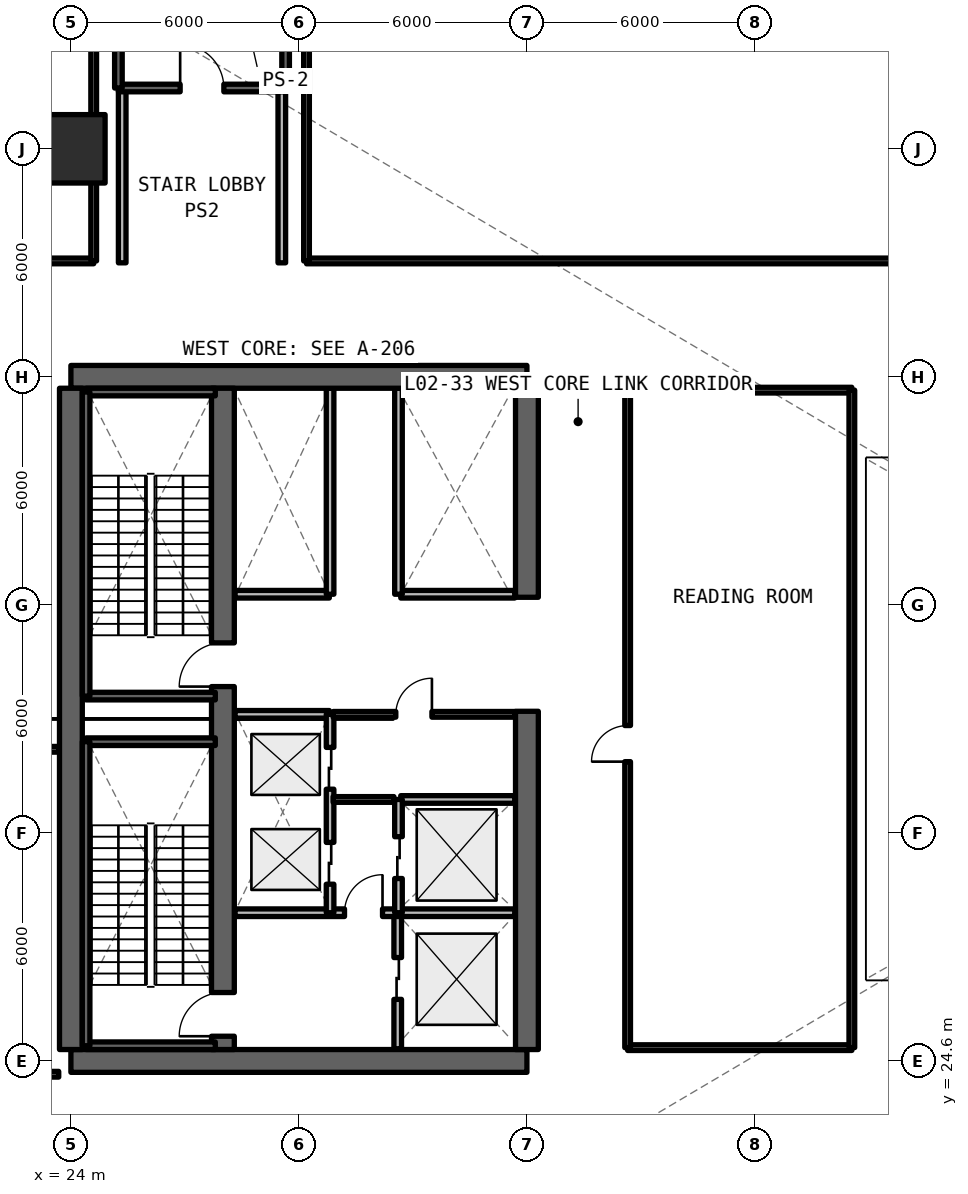
"""IFC4 building model, lengths in metres.
Left out: names, types, materials, properties, quantities, classifications, styles, units other than length and angle.
Written with IfcOpenShell. Run it as: python <this file> out.ifc"""

import sys

from ifc_helpers import new_model, si_unit, direction, frame, frame_2d, origin, origin_2d, place, context, subcontext, project, spatial, rectangle, extrude, element, fill, save


model = new_model("IFC4")
c1 = context("Model", 3, precision=1e-05, world=origin(), true_north=direction((0.0, 1.0)))
c2 = subcontext(c1, "Body", "Model", "MODEL_VIEW")
j1 = project(units=[si_unit("LENGTHUNIT", "METRE"), si_unit("PLANEANGLEUNIT", "RADIAN")], contexts=[c1])
p1 = place(None, origin())
s1 = spatial("IfcSite", under=j1, at=p1, CompositionType="ELEMENT")
p2 = place(p1, origin())
s2 = spatial("IfcBuilding", under=s1, at=p2, CompositionType="ELEMENT")
p3 = place(p2, frame((0.0, 0.0, 4.95)))
s3 = spatial("IfcBuildingStorey", under=s2, at=p3, CompositionType="ELEMENT", Elevation=4.95)
for number, where, z_axis, x_axis in (
    (1, (24.0, 24.6, 0.0), (0.0, 0.0, 1.0), (1.0, 0.0, 0.0)),
    (2, (36.0, 42.6, 0.0), (0.0, 0.0, 1.0), (-1.0, 0.0, 0.0)),
):
    element("IfcWall", number, at=place(p3, frame(where, z_axis=z_axis, x_axis=x_axis)), inside=s3, PredefinedType="SHEAR", context=c2, shape_type="SweptSolid", body=[
        extrude(rectangle(XDim=12.0, YDim=0.6, at=frame_2d((6.0, 0.0))), origin(), (0.0, 0.0, 1.0), 4.95),
    ])
p4 = place(p3, frame((24.0, 24.9, 0.0), z_axis=(0.0, 0.0, 1.0), x_axis=(0.0, 1.0, 0.0)))
e3 = element("IfcWall", 3, at=p4, inside=s3, PredefinedType="SHEAR", context=c2, shape_type="SweptSolid", body=[
    extrude(rectangle(XDim=17.4, YDim=0.6, at=frame_2d((8.7, 0.0))), origin(), (0.0, 0.0, 1.0), 4.95),
])
p5 = place(p3, frame((36.0, 24.9, 0.0), z_axis=(0.0, 0.0, 1.0), x_axis=(0.0, 1.0, 0.0)))
e4 = element("IfcWall", 4, at=p5, inside=s3, PredefinedType="SHEAR", context=c2, shape_type="SweptSolid", body=[
    extrude(rectangle(XDim=8.9, YDim=0.6, at=frame_2d((4.45, 0.0))), origin(), (0.0, 0.0, 1.0), 4.95),
])
p6 = place(p3, frame((36.0, 36.8, 0.0), z_axis=(0.0, 0.0, 1.0), x_axis=(0.0, 1.0, 0.0)))
e5 = element("IfcWall", 5, at=p6, inside=s3, PredefinedType="SHEAR", context=c2, shape_type="SweptSolid", body=[
    extrude(rectangle(XDim=5.5, YDim=0.6, at=frame_2d((2.75, 0.0))), origin(), (0.0, 0.0, 1.0), 4.95),
])
p7 = place(p3, frame((28.0, 24.9, 0.0), z_axis=(0.0, 0.0, 1.0), x_axis=(0.0, 1.0, 0.0)))
e6 = element("IfcWall", 6, at=p7, inside=s3, PredefinedType="SHEAR", context=c2, shape_type="SweptSolid", body=[
    extrude(rectangle(XDim=17.4, YDim=0.6, at=frame_2d((8.7, 0.0))), origin(), (0.0, 0.0, 1.0), 4.95),
])
p8 = place(p7, frame((0.35, 0.0, 0.0)))
e7 = element("IfcOpeningElement", 7, at=p8, cuts=e6, PredefinedType="OPENING", context=c2, shape_type="SweptSolid", body=[
    extrude(rectangle(XDim=1.15, YDim=2.15, at=frame_2d((0.575, 1.075))), frame((0.0, 0.31, 0.0), z_axis=(0.0, -1.0, 0.0), x_axis=(1.0, 0.0, 0.0)), (0.0, 0.0, 1.0), 0.62),
])
p9 = place(p7, frame((9.55, 0.0, 0.0)))
e8 = element("IfcOpeningElement", 8, at=p9, cuts=e6, PredefinedType="OPENING", context=c2, shape_type="SweptSolid", body=[
    extrude(rectangle(XDim=1.15, YDim=2.15, at=frame_2d((0.575, 1.075))), frame((0.0, 0.31, 0.0), z_axis=(0.0, -1.0, 0.0), x_axis=(1.0, 0.0, 0.0)), (0.0, 0.0, 1.0), 0.62),
])
p10 = place(p3, frame((24.0, 48.6, 0.0), z_axis=(0.0, 0.0, 1.0), x_axis=(1.0, 0.0, 0.0)))
e9 = element("IfcColumn", 9, at=p10, inside=s3, PredefinedType="COLUMN", context=c2, shape_type="SweptSolid", body=[
    extrude(rectangle(XDim=1.8, YDim=1.8, at=origin_2d()), origin(), (0.0, 0.0, 1.0), 4.95),
])
p11 = place(p3, frame((32.6, 24.92, 0.0), z_axis=(0.0, 0.0, 1.0), x_axis=(0.0, 1.0, 0.0)))
e10 = element("IfcWall", 10, at=p11, inside=s3, PredefinedType="SOLIDWALL", context=c2, shape_type="SweptSolid", body=[
    extrude(rectangle(XDim=3.58, YDim=0.2, at=frame_2d((1.79, 0.0))), origin(), (0.0, 0.0, 1.0), 3.89),
])
p12 = place(p11, frame((1.3, 0.0, 0.0)))
e11 = element("IfcOpeningElement", 11, at=p12, cuts=e10, PredefinedType="OPENING", context=c2, shape_type="SweptSolid", body=[
    extrude(rectangle(XDim=1.1, YDim=2.2, at=frame_2d((0.55, 1.1))), frame((0.0, 0.11, 0.0), z_axis=(0.0, -1.0, 0.0), x_axis=(1.0, 0.0, 0.0)), (0.0, 0.0, 1.0), 0.22),
])
p13 = place(p3, frame((28.32, 28.5, 0.0), z_axis=(0.0, 0.0, 1.0), x_axis=(1.0, 0.0, 0.0)))
e12 = element("IfcWall", 12, at=p13, inside=s3, PredefinedType="SOLIDWALL", context=c2, shape_type="SweptSolid", body=[
    extrude(rectangle(XDim=7.36, YDim=0.2, at=frame_2d((3.68, 0.0))), origin(), (0.0, 0.0, 1.0), 3.89),
])
p14 = place(p13, frame((2.88, 0.0, 0.0)))
e13 = element("IfcOpeningElement", 13, at=p14, cuts=e12, PredefinedType="OPENING", context=c2, shape_type="SweptSolid", body=[
    extrude(rectangle(XDim=1.0, YDim=2.15, at=frame_2d((0.5, 1.075))), frame((0.0, 0.11, 0.0), z_axis=(0.0, -1.0, 0.0), x_axis=(1.0, 0.0, 0.0)), (0.0, 0.0, 1.0), 0.22),
])
p15 = place(p3, frame((28.32, 33.72, 0.0), z_axis=(0.0, 0.0, 1.0), x_axis=(1.0, 0.0, 0.0)))
e14 = element("IfcWall", 14, at=p15, inside=s3, PredefinedType="SOLIDWALL", context=c2, shape_type="SweptSolid", body=[
    extrude(rectangle(XDim=2.48, YDim=0.2, at=frame_2d((1.24, 0.0))), origin(), (0.0, 0.0, 1.0), 3.89),
])
p16 = place(p3, frame((30.82, 28.5, 0.0), z_axis=(0.0, 0.0, 1.0), x_axis=(0.0, 1.0, 0.0)))
e15 = element("IfcWall", 15, at=p16, inside=s3, PredefinedType="SOLIDWALL", context=c2, shape_type="SweptSolid", body=[
    extrude(rectangle(XDim=5.22, YDim=0.2, at=frame_2d((2.61, 0.0))), origin(), (0.0, 0.0, 1.0), 3.89),
])
p17 = place(p16, frame((0.75, 0.0, 0.0)))
e16 = element("IfcOpeningElement", 16, at=p17, cuts=e15, PredefinedType="OPENING", context=c2, shape_type="SweptSolid", body=[
    extrude(rectangle(XDim=1.1, YDim=2.2, at=frame_2d((0.55, 1.1))), frame((0.0, 0.11, 0.0), z_axis=(0.0, -1.0, 0.0), x_axis=(1.0, 0.0, 0.0)), (0.0, 0.0, 1.0), 0.22),
])
p18 = place(p16, frame((3.25, 0.0, 0.0)))
e17 = element("IfcOpeningElement", 17, at=p18, cuts=e15, PredefinedType="OPENING", context=c2, shape_type="SweptSolid", body=[
    extrude(rectangle(XDim=1.1, YDim=2.2, at=frame_2d((0.55, 1.1))), frame((0.0, 0.11, 0.0), z_axis=(0.0, -1.0, 0.0), x_axis=(1.0, 0.0, 0.0)), (0.0, 0.0, 1.0), 0.22),
])
p19 = place(p3, frame((32.68, 31.48, 0.0), z_axis=(0.0, 0.0, 1.0), x_axis=(1.0, 0.0, 0.0)))
e18 = element("IfcWall", 18, at=p19, inside=s3, PredefinedType="SOLIDWALL", context=c2, shape_type="SweptSolid", body=[
    extrude(rectangle(XDim=3.0, YDim=0.2, at=frame_2d((1.5, 0.0))), origin(), (0.0, 0.0, 1.0), 3.89),
])
p20 = place(p3, frame((32.62, 28.5, 0.0), z_axis=(0.0, 0.0, 1.0), x_axis=(0.0, 1.0, 0.0)))
e19 = element("IfcWall", 19, at=p20, inside=s3, PredefinedType="SOLIDWALL", context=c2, shape_type="SweptSolid", body=[
    extrude(rectangle(XDim=2.98, YDim=0.2, at=frame_2d((1.49, 0.0))), origin(), (0.0, 0.0, 1.0), 3.89),
])
p21 = place(p20, frame((0.9, 0.0, 0.0)))
e20 = element("IfcOpeningElement", 20, at=p21, cuts=e19, PredefinedType="OPENING", context=c2, shape_type="SweptSolid", body=[
    extrude(rectangle(XDim=1.1, YDim=2.2, at=frame_2d((0.55, 1.1))), frame((0.0, 0.11, 0.0), z_axis=(0.0, -1.0, 0.0), x_axis=(1.0, 0.0, 0.0)), (0.0, 0.0, 1.0), 0.22),
])
p22 = place(p3, frame((30.9, 31.48, 0.0), z_axis=(0.0, 0.0, 1.0), x_axis=(1.0, 0.0, 0.0)))
e21 = element("IfcWall", 21, at=p22, inside=s3, PredefinedType="SOLIDWALL", context=c2, shape_type="SweptSolid", body=[
    extrude(rectangle(XDim=1.6, YDim=0.15, at=frame_2d((0.8, 0.0))), origin(), (0.0, 0.0, 1.0), 3.89),
])
p23 = place(p3, frame((30.9, 33.72, 0.0), z_axis=(0.0, 0.0, 1.0), x_axis=(1.0, 0.0, 0.0)))
e22 = element("IfcWall", 22, at=p23, inside=s3, PredefinedType="SOLIDWALL", context=c2, shape_type="SweptSolid", body=[
    extrude(rectangle(XDim=4.78, YDim=0.15, at=frame_2d((2.39, 0.0))), origin(), (0.0, 0.0, 1.0), 3.89),
])
p24 = place(p23, frame((1.65, 0.0, 0.0)))
e23 = element("IfcOpeningElement", 23, at=p24, cuts=e22, PredefinedType="OPENING", context=c2, shape_type="SweptSolid", body=[
    extrude(rectangle(XDim=0.95, YDim=2.15, at=frame_2d((0.475, 1.075))), frame((0.0, 0.085, 0.0), z_axis=(0.0, -1.0, 0.0), x_axis=(1.0, 0.0, 0.0)), (0.0, 0.0, 1.0), 0.17),
])
p25 = place(p3, frame((28.32, 36.88, 0.0), z_axis=(0.0, 0.0, 1.0), x_axis=(1.0, 0.0, 0.0)))
e24 = element("IfcWall", 24, at=p25, inside=s3, PredefinedType="SOLIDWALL", context=c2, shape_type="SweptSolid", body=[
    extrude(rectangle(XDim=2.48, YDim=0.2, at=frame_2d((1.24, 0.0))), origin(), (0.0, 0.0, 1.0), 3.89),
])
p26 = place(p3, frame((30.82, 36.88, 0.0), z_axis=(0.0, 0.0, 1.0), x_axis=(0.0, 1.0, 0.0)))
e25 = element("IfcWall", 25, at=p26, inside=s3, PredefinedType="SOLIDWALL", context=c2, shape_type="SweptSolid", body=[
    extrude(rectangle(XDim=5.42, YDim=0.2, at=frame_2d((2.71, 0.0))), origin(), (0.0, 0.0, 1.0), 3.89),
])
p27 = place(p3, frame((32.68, 36.88, 0.0), z_axis=(0.0, 0.0, 1.0), x_axis=(1.0, 0.0, 0.0)))
e26 = element("IfcWall", 26, at=p27, inside=s3, PredefinedType="SOLIDWALL", context=c2, shape_type="SweptSolid", body=[
    extrude(rectangle(XDim=3.0, YDim=0.2, at=frame_2d((1.5, 0.0))), origin(), (0.0, 0.0, 1.0), 3.89),
])
p28 = place(p3, frame((32.62, 36.88, 0.0), z_axis=(0.0, 0.0, 1.0), x_axis=(0.0, 1.0, 0.0)))
e27 = element("IfcWall", 27, at=p28, inside=s3, PredefinedType="SOLIDWALL", context=c2, shape_type="SweptSolid", body=[
    extrude(rectangle(XDim=5.42, YDim=0.2, at=frame_2d((2.71, 0.0))), origin(), (0.0, 0.0, 1.0), 3.89),
])
for number, where, z_axis, x_axis in (
    (28, (25.35, 45.6, 0.0), (0.0, 0.0, 1.0), (0.0, 1.0, 0.0)),
    (29, (29.55, 45.6, 0.0), (0.0, 0.0, 1.0), (0.0, 1.0, 0.0)),
):
    element("IfcWall", number, at=place(p3, frame(where, z_axis=z_axis, x_axis=x_axis)), inside=s3, PredefinedType="SOLIDWALL", context=c2, shape_type="SweptSolid", body=[
        extrude(rectangle(XDim=4.6, YDim=0.2, at=frame_2d((2.3, 0.0))), origin(), (0.0, 0.0, 1.0), 3.89),
    ])
p29 = place(p3, frame((30.2, 45.65, 0.0), z_axis=(0.0, 0.0, 1.0), x_axis=(1.0, 0.0, 0.0)))
e30 = element("IfcWall", 30, at=p29, inside=s3, PredefinedType="SOLIDWALL", context=c2, shape_type="SweptSolid", body=[
    extrude(rectangle(XDim=36.0, YDim=0.15, at=frame_2d((18.0, 0.0))), origin(), (0.0, 0.0, 1.0), 3.89),
])
p30 = place(p29, frame((17.3, 0.0, 0.0)))
e31 = element("IfcOpeningElement", 31, at=p30, cuts=e30, PredefinedType="OPENING", context=c2, shape_type="SweptSolid", body=[
    extrude(rectangle(XDim=1.4, YDim=2.15, at=frame_2d((0.7, 1.075))), frame((0.0, 0.085, 0.0), z_axis=(0.0, -1.0, 0.0), x_axis=(1.0, 0.0, 0.0)), (0.0, 0.0, 1.0), 0.17),
])
p31 = place(p3, frame((30.2, 45.65, 0.0), z_axis=(0.0, 0.0, 1.0), x_axis=(0.0, 1.0, 0.0)))
e32 = element("IfcWall", 32, at=p31, inside=s3, PredefinedType="SOLIDWALL", context=c2, shape_type="SweptSolid", body=[
    extrude(rectangle(XDim=20.25, YDim=0.15, at=frame_2d((10.125, 0.0))), origin(), (0.0, 0.0, 1.0), 3.89),
])
p32 = place(p3, frame((16.6, 24.25, 0.0), z_axis=(0.0, 0.0, 1.0), x_axis=(1.0, 0.0, 0.0)))
e33 = element("IfcWall", 33, at=p32, inside=s3, PredefinedType="SOLIDWALL", context=c2, shape_type="SweptSolid", body=[
    extrude(rectangle(XDim=7.08, YDim=0.15, at=frame_2d((3.54, 0.0))), origin(), (0.0, 0.0, 1.0), 3.89),
])
p33 = place(p32, frame((2.125, 0.0, 0.0)))
e34 = element("IfcOpeningElement", 34, at=p33, cuts=e33, PredefinedType="OPENING", context=c2, shape_type="SweptSolid", body=[
    extrude(rectangle(XDim=0.95, YDim=2.15, at=frame_2d((0.475, 1.075))), frame((0.0, 0.085, 0.0), z_axis=(0.0, -1.0, 0.0), x_axis=(1.0, 0.0, 0.0)), (0.0, 0.0, 1.0), 0.17),
])
p34 = place(p3, frame((16.6, 32.8, 0.0), z_axis=(0.0, 0.0, 1.0), x_axis=(1.0, 0.0, 0.0)))
e35 = element("IfcWall", 35, at=p34, inside=s3, PredefinedType="SOLIDWALL", context=c2, shape_type="SweptSolid", body=[
    extrude(rectangle(XDim=7.08, YDim=0.15, at=frame_2d((3.54, 0.0))), origin(), (0.0, 0.0, 1.0), 3.89),
])
p35 = place(p3, frame((10.0, 45.65, 0.0), z_axis=(0.0, 0.0, 1.0), x_axis=(1.0, 0.0, 0.0)))
e36 = element("IfcWall", 36, at=p35, inside=s3, PredefinedType="SOLIDWALL", context=c2, shape_type="SweptSolid", body=[
    extrude(rectangle(XDim=14.6, YDim=0.15, at=frame_2d((7.3, 0.0))), origin(), (0.0, 0.0, 1.0), 3.89),
])
p36 = place(p35, frame((6.75, 0.0, 0.0)))
e37 = element("IfcOpeningElement", 37, at=p36, cuts=e36, PredefinedType="OPENING", context=c2, shape_type="SweptSolid", body=[
    extrude(rectangle(XDim=1.1, YDim=2.15, at=frame_2d((0.55, 1.075))), frame((0.0, 0.085, 0.0), z_axis=(0.0, -1.0, 0.0), x_axis=(1.0, 0.0, 0.0)), (0.0, 0.0, 1.0), 0.17),
])
p37 = place(p3, frame((24.6, 45.65, 0.0), z_axis=(0.0, 0.0, 1.0), x_axis=(0.0, 1.0, 0.0)))
e38 = element("IfcWall", 38, at=p37, inside=s3, PredefinedType="SOLIDWALL", context=c2, shape_type="SweptSolid", body=[
    extrude(rectangle(XDim=20.25, YDim=0.15, at=frame_2d((10.125, 0.0))), origin(), (0.0, 0.0, 1.0), 3.89),
])
for number, where, z_axis, x_axis in (
    (39, (38.65, 24.95, 0.0), (0.0, 0.0, 1.0), (1.0, 0.0, 0.0)),
    (40, (38.65, 42.25, 0.0), (0.0, 0.0, 1.0), (1.0, 0.0, 0.0)),
):
    element("IfcWall", number, at=place(p3, frame(where, z_axis=z_axis, x_axis=x_axis)), inside=s3, PredefinedType="SOLIDWALL", context=c2, shape_type="SweptSolid", body=[
        extrude(rectangle(XDim=5.9, YDim=0.15, at=frame_2d((2.95, 0.0))), origin(), (0.0, 0.0, 1.0), 3.89),
    ])
p38 = place(p3, frame((38.65, 24.95, 0.0), z_axis=(0.0, 0.0, 1.0), x_axis=(0.0, 1.0, 0.0)))
e41 = element("IfcWall", 41, at=p38, inside=s3, PredefinedType="SOLIDWALL", context=c2, shape_type="SweptSolid", body=[
    extrude(rectangle(XDim=17.3, YDim=0.15, at=frame_2d((8.65, 0.0))), origin(), (0.0, 0.0, 1.0), 3.89),
])
p39 = place(p38, frame((7.525, 0.0, 0.0)))
e42 = element("IfcOpeningElement", 42, at=p39, cuts=e41, PredefinedType="OPENING", context=c2, shape_type="SweptSolid", body=[
    extrude(rectangle(XDim=0.95, YDim=2.15, at=frame_2d((0.475, 1.075))), frame((0.0, 0.085, 0.0), z_axis=(0.0, -1.0, 0.0), x_axis=(1.0, 0.0, 0.0)), (0.0, 0.0, 1.0), 0.17),
])
p40 = place(p3, frame((44.55, 24.95, 0.0), z_axis=(0.0, 0.0, 1.0), x_axis=(0.0, 1.0, 0.0)))
e43 = element("IfcWall", 43, at=p40, inside=s3, PredefinedType="SOLIDWALL", context=c2, shape_type="SweptSolid", body=[
    extrude(rectangle(XDim=17.3, YDim=0.15, at=frame_2d((8.65, 0.0))), origin(), (0.0, 0.0, 1.0), 3.89),
])
for number, where, z_axis, x_axis in (
    (44, (24.4, 25.0, 0.0), (0.0, 0.0, 1.0), (1.0, 0.0, 0.0)),
    (45, (27.8, 33.0, 0.0), (0.0, 0.0, 1.0), (-1.0, 0.0, 0.0)),
):
    element("IfcWall", number, at=place(p3, frame(where, z_axis=z_axis, x_axis=x_axis)), inside=s3, PredefinedType="SOLIDWALL", context=c2, shape_type="SweptSolid", body=[
        extrude(rectangle(XDim=3.4, YDim=0.2, at=frame_2d((1.7, 0.0))), origin(), (0.0, 0.0, 1.0), 4.95),
    ])
p41 = place(p3, frame((24.4, 33.0, 0.0), z_axis=(0.0, 0.0, 1.0), x_axis=(0.0, -1.0, 0.0)))
e46 = element("IfcWall", 46, at=p41, inside=s3, PredefinedType="SOLIDWALL", context=c2, shape_type="SweptSolid", body=[
    extrude(rectangle(XDim=8.0, YDim=0.2, at=frame_2d((4.0, 0.0))), origin(), (0.0, 0.0, 1.0), 4.95),
])
for number, where, z_axis, x_axis in (
    (47, (24.4, 34.2, 0.0), (0.0, 0.0, 1.0), (1.0, 0.0, 0.0)),
    (48, (27.8, 42.2, 0.0), (0.0, 0.0, 1.0), (-1.0, 0.0, 0.0)),
):
    element("IfcWall", number, at=place(p3, frame(where, z_axis=z_axis, x_axis=x_axis)), inside=s3, PredefinedType="SOLIDWALL", context=c2, shape_type="SweptSolid", body=[
        extrude(rectangle(XDim=3.4, YDim=0.2, at=frame_2d((1.7, 0.0))), origin(), (0.0, 0.0, 1.0), 4.95),
    ])
p42 = place(p3, frame((24.4, 42.2, 0.0), z_axis=(0.0, 0.0, 1.0), x_axis=(0.0, -1.0, 0.0)))
e49 = element("IfcWall", 49, at=p42, inside=s3, PredefinedType="SOLIDWALL", context=c2, shape_type="SweptSolid", body=[
    extrude(rectangle(XDim=8.0, YDim=0.2, at=frame_2d((4.0, 0.0))), origin(), (0.0, 0.0, 1.0), 4.95),
])
p43 = place(p3, frame((25.25, 50.2, 0.0), z_axis=(0.0, 0.0, 1.0), x_axis=(1.0, 0.0, 0.0)))
e50 = element("IfcWall", 50, at=p43, inside=s3, PredefinedType="SOLIDWALL", context=c2, shape_type="SweptSolid", body=[
    extrude(rectangle(XDim=4.4, YDim=0.2, at=frame_2d((2.2, 0.0))), origin(), (0.0, 0.0, 1.0), 4.95),
])
p44 = place(p43, frame((1.625, 0.0, 0.0)))
e51 = element("IfcOpeningElement", 51, at=p44, cuts=e50, PredefinedType="OPENING", context=c2, shape_type="SweptSolid", body=[
    extrude(rectangle(XDim=1.15, YDim=2.15, at=frame_2d((0.575, 1.075))), frame((0.0, 0.11, 0.0), z_axis=(0.0, -1.0, 0.0), x_axis=(1.0, 0.0, 0.0)), (0.0, 0.0, 1.0), 0.22),
])
for number, where, z_axis, x_axis in (
    (52, (29.65, 50.2, 0.0), (0.0, 0.0, 1.0), (0.0, 1.0, 0.0)),
    (53, (25.25, 58.8, 0.0), (0.0, 0.0, 1.0), (0.0, -1.0, 0.0)),
):
    element("IfcWall", number, at=place(p3, frame(where, z_axis=z_axis, x_axis=x_axis)), inside=s3, PredefinedType="SOLIDWALL", context=c2, shape_type="SweptSolid", body=[
        extrude(rectangle(XDim=8.6, YDim=0.2, at=frame_2d((4.3, 0.0))), origin(), (0.0, 0.0, 1.0), 4.95),
    ])
p45 = place(p12, origin())
e54 = element("IfcDoor", 54, at=p45, inside=s3, OperationType="SLIDING_TO_LEFT", PredefinedType="DOOR", context=c2, shape_type="SweptSolid", body=[
    extrude(rectangle(XDim=1.1, YDim=2.2, at=frame_2d((0.55, 1.1))), frame((0.0, 0.025, 0.0), z_axis=(0.0, -1.0, 0.0), x_axis=(1.0, 0.0, 0.0)), (0.0, 0.0, 1.0), 0.05),
])
fill(e11, e54)
p46 = place(p14, origin())
e55 = element("IfcDoor", 55, at=p46, inside=s3, OperationType="SINGLE_SWING_RIGHT", PredefinedType="DOOR", context=c2, shape_type="SweptSolid", body=[
    extrude(rectangle(XDim=1.0, YDim=2.15, at=frame_2d((0.5, 1.075))), frame((0.0, 0.025, 0.0), z_axis=(0.0, -1.0, 0.0), x_axis=(1.0, 0.0, 0.0)), (0.0, 0.0, 1.0), 0.05),
])
fill(e13, e55)
p47 = place(p17, origin())
e56 = element("IfcDoor", 56, at=p47, inside=s3, OperationType="SLIDING_TO_LEFT", PredefinedType="DOOR", context=c2, shape_type="SweptSolid", body=[
    extrude(rectangle(XDim=1.1, YDim=2.2, at=frame_2d((0.55, 1.1))), frame((0.0, 0.025, 0.0), z_axis=(0.0, -1.0, 0.0), x_axis=(1.0, 0.0, 0.0)), (0.0, 0.0, 1.0), 0.05),
])
fill(e16, e56)
p48 = place(p18, origin())
e57 = element("IfcDoor", 57, at=p48, inside=s3, OperationType="SLIDING_TO_RIGHT", PredefinedType="DOOR", context=c2, shape_type="SweptSolid", body=[
    extrude(rectangle(XDim=1.1, YDim=2.2, at=frame_2d((0.55, 1.1))), frame((0.0, 0.025, 0.0), z_axis=(0.0, -1.0, 0.0), x_axis=(1.0, 0.0, 0.0)), (0.0, 0.0, 1.0), 0.05),
])
fill(e17, e57)
p49 = place(p21, origin())
e58 = element("IfcDoor", 58, at=p49, inside=s3, OperationType="SLIDING_TO_LEFT", PredefinedType="DOOR", context=c2, shape_type="SweptSolid", body=[
    extrude(rectangle(XDim=1.1, YDim=2.2, at=frame_2d((0.55, 1.1))), frame((0.0, 0.025, 0.0), z_axis=(0.0, -1.0, 0.0), x_axis=(1.0, 0.0, 0.0)), (0.0, 0.0, 1.0), 0.05),
])
fill(e20, e58)
p50 = place(p24, origin())
e59 = element("IfcDoor", 59, at=p50, inside=s3, OperationType="SINGLE_SWING_RIGHT", PredefinedType="DOOR", context=c2, shape_type="SweptSolid", body=[
    extrude(rectangle(XDim=0.95, YDim=2.15, at=frame_2d((0.475, 1.075))), frame((0.0, 0.025, 0.0), z_axis=(0.0, -1.0, 0.0), x_axis=(1.0, 0.0, 0.0)), (0.0, 0.0, 1.0), 0.05),
])
fill(e23, e59)
p51 = place(p39, origin())
e60 = element("IfcDoor", 60, at=p51, inside=s3, OperationType="SINGLE_SWING_LEFT", PredefinedType="DOOR", context=c2, shape_type="SweptSolid", body=[
    extrude(rectangle(XDim=0.95, YDim=2.15, at=frame_2d((0.475, 1.075))), frame((0.0, 0.025, 0.0), z_axis=(0.0, -1.0, 0.0), x_axis=(1.0, 0.0, 0.0)), (0.0, 0.0, 1.0), 0.05),
])
fill(e42, e60)
p52 = place(p8, origin())
e61 = element("IfcDoor", 61, at=p52, inside=s3, OperationType="SINGLE_SWING_RIGHT", PredefinedType="DOOR", context=c2, shape_type="SweptSolid", body=[
    extrude(rectangle(XDim=1.15, YDim=2.15, at=frame_2d((0.575, 1.075))), frame((0.0, 0.025, 0.0), z_axis=(0.0, -1.0, 0.0), x_axis=(1.0, 0.0, 0.0)), (0.0, 0.0, 1.0), 0.05),
])
fill(e7, e61)
p53 = place(p9, origin())
e62 = element("IfcDoor", 62, at=p53, inside=s3, OperationType="SINGLE_SWING_LEFT", PredefinedType="DOOR", context=c2, shape_type="SweptSolid", body=[
    extrude(rectangle(XDim=1.15, YDim=2.15, at=frame_2d((0.575, 1.075))), frame((0.0, 0.025, 0.0), z_axis=(0.0, -1.0, 0.0), x_axis=(1.0, 0.0, 0.0)), (0.0, 0.0, 1.0), 0.05),
])
fill(e8, e62)
p54 = place(p44, origin())
e63 = element("IfcDoor", 63, at=p54, inside=s3, OperationType="SINGLE_SWING_LEFT", PredefinedType="DOOR", context=c2, shape_type="SweptSolid", body=[
    extrude(rectangle(XDim=1.15, YDim=2.15, at=frame_2d((0.575, 1.075))), frame((0.0, 0.025, 0.0), z_axis=(0.0, -1.0, 0.0), x_axis=(1.0, 0.0, 0.0)), (0.0, 0.0, 1.0), 0.05),
])
fill(e51, e63)
save(model, sys.argv[1])
